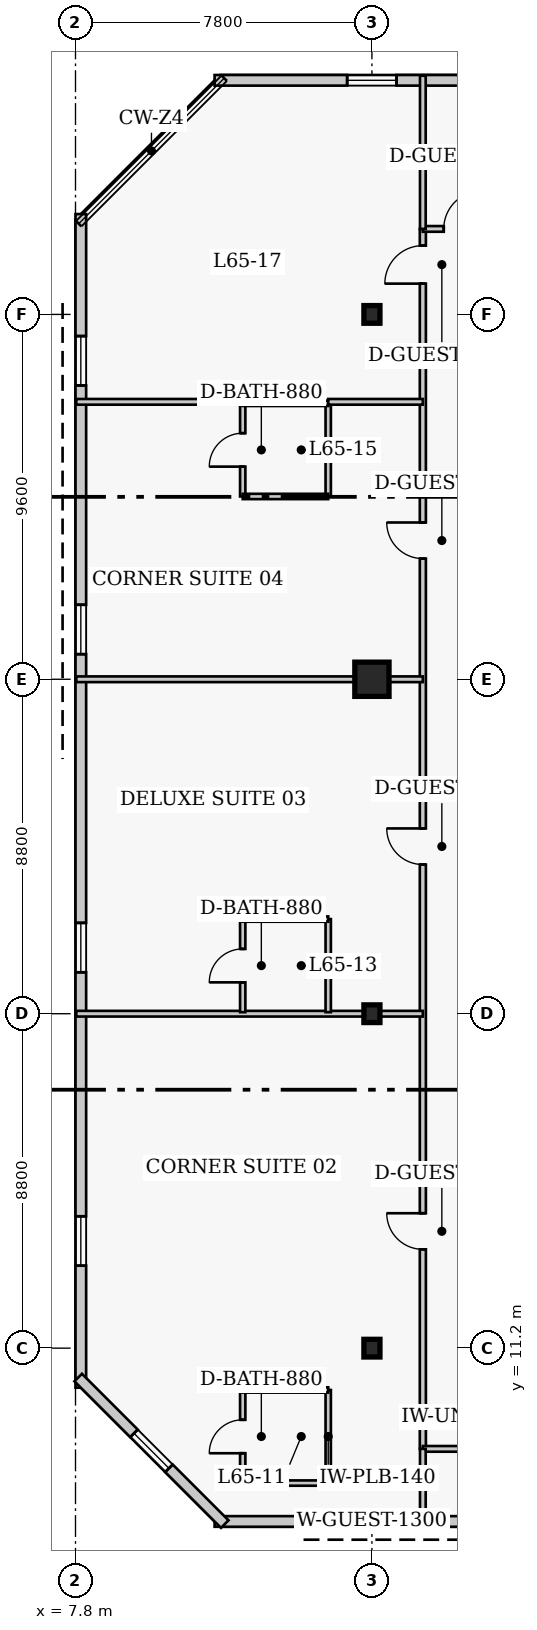
"""IFC4 building model, lengths in metres.
Left out: names, types, materials, properties, quantities, classifications, styles, units other than length and angle.
Written with IfcOpenShell. Run it as: python <this file> out.ifc"""

import sys

from ifc_helpers import new_model, si_unit, direction, frame, frame_2d, origin, origin_2d, place, context, subcontext, project, spatial, rectangle, i_section, extrude, element, fill, save


model = new_model("IFC4")
c1 = context("Model", 3, precision=1e-05, world=origin(), true_north=direction((0.0, 1.0)))
c2 = subcontext(c1, "Body", "Model", "MODEL_VIEW")
j1 = project(units=[si_unit("LENGTHUNIT", "METRE"), si_unit("PLANEANGLEUNIT", "RADIAN")], contexts=[c1])
p1 = place(None, origin())
s1 = spatial("IfcSite", under=j1, at=p1, CompositionType="ELEMENT")
p2 = place(p1, origin())
s2 = spatial("IfcBuilding", under=s1, at=p2, CompositionType="ELEMENT")
p3 = place(p2, frame((0.0, 0.0, 261.4)))
s3 = spatial("IfcBuildingStorey", under=s2, at=p3, CompositionType="ELEMENT", Elevation=261.4)
for number, where, z_axis, x_axis in (
    (1, (15.6, 11.2, 0.0), (0.0, 0.0, 1.0), (1.0, 0.0, 0.0)),
    (2, (15.6, 20.0, 0.0), (0.0, 0.0, 1.0), (1.0, 0.0, 0.0)),
):
    element("IfcColumn", number, at=place(p3, frame(where, z_axis=z_axis, x_axis=x_axis)), inside=s3, PredefinedType="COLUMN", context=c2, shape_type="SweptSolid", body=[
        extrude(i_section(OverallWidth=0.422, OverallDepth=0.465, WebThickness=0.045, FlangeThickness=0.073, FilletRadius=0.017, at=origin_2d()), origin(), (0.0, 0.0, 1.0), 4.0),
    ])
p4 = place(p3, frame((15.6, 28.8, 0.0), z_axis=(0.0, 0.0, 1.0), x_axis=(1.0, 0.0, 0.0)))
e3 = element("IfcColumn", 3, at=p4, inside=s3, PredefinedType="COLUMN", context=c2, shape_type="SweptSolid", body=[
    extrude(rectangle(XDim=0.9, YDim=0.9, at=origin_2d()), origin(), (0.0, 0.0, 1.0), 4.0),
])
p5 = place(p3, frame((15.6, 38.4, 0.0), z_axis=(0.0, 0.0, 1.0), x_axis=(1.0, 0.0, 0.0)))
e4 = element("IfcColumn", 4, at=p5, inside=s3, PredefinedType="COLUMN", context=c2, shape_type="SweptSolid", body=[
    extrude(i_section(OverallWidth=0.422, OverallDepth=0.465, WebThickness=0.045, FlangeThickness=0.073, FilletRadius=0.017, at=origin_2d()), origin(), (0.0, 0.0, 1.0), 4.0),
])
p6 = place(p3, frame((11.46, 6.64, 0.0), z_axis=(0.0, 0.0, 1.0), x_axis=(1.0, 0.0, 0.0)))
e5 = element("IfcWall", 5, at=p6, inside=s3, PredefinedType="SOLIDWALL", context=c2, shape_type="SweptSolid", body=[
    extrude(rectangle(XDim=24.83, YDim=0.28, at=frame_2d((12.415, 0.0))), origin(), (0.0, 0.0, 1.0), 3.76),
])
p7 = place(p6, frame((3.488, 0.0, 0.85)))
e6 = element("IfcOpeningElement", 6, at=p7, cuts=e5, PredefinedType="OPENING", context=c2, shape_type="SweptSolid", body=[
    extrude(rectangle(XDim=1.3, YDim=1.7, at=frame_2d((0.65, 0.85))), frame((0.0, 0.15, 0.0), z_axis=(0.0, -1.0, 0.0), x_axis=(1.0, 0.0, 0.0)), (0.0, 0.0, 1.0), 0.3),
])
p8 = place(p6, frame((12.915, 0.0, 0.85)))
e7 = element("IfcOpeningElement", 7, at=p8, cuts=e5, PredefinedType="OPENING", context=c2, shape_type="SweptSolid", body=[
    extrude(rectangle(XDim=1.3, YDim=1.7, at=frame_2d((0.65, 0.85))), frame((0.0, 0.15, 0.0), z_axis=(0.0, -1.0, 0.0), x_axis=(1.0, 0.0, 0.0)), (0.0, 0.0, 1.0), 0.3),
])
p9 = place(p6, frame((20.692, 0.0, 0.85)))
e8 = element("IfcOpeningElement", 8, at=p9, cuts=e5, PredefinedType="OPENING", context=c2, shape_type="SweptSolid", body=[
    extrude(rectangle(XDim=1.3, YDim=1.7, at=frame_2d((0.65, 0.85))), frame((0.0, 0.15, 0.0), z_axis=(0.0, -1.0, 0.0), x_axis=(1.0, 0.0, 0.0)), (0.0, 0.0, 1.0), 0.3),
])
p10 = place(p3, frame((36.29, 44.56, 0.0), z_axis=(0.0, 0.0, 1.0), x_axis=(-1.0, 0.0, 0.0)))
e9 = element("IfcWall", 9, at=p10, inside=s3, PredefinedType="SOLIDWALL", context=c2, shape_type="SweptSolid", body=[
    extrude(rectangle(XDim=24.83, YDim=0.28, at=frame_2d((12.415, 0.0))), origin(), (0.0, 0.0, 1.0), 3.76),
])
p11 = place(p10, frame((3.488, 0.0, 0.85)))
e10 = element("IfcOpeningElement", 10, at=p11, cuts=e9, PredefinedType="OPENING", context=c2, shape_type="SweptSolid", body=[
    extrude(rectangle(XDim=1.3, YDim=1.7, at=frame_2d((0.65, 0.85))), frame((0.0, 0.15, 0.0), z_axis=(0.0, -1.0, 0.0), x_axis=(1.0, 0.0, 0.0)), (0.0, 0.0, 1.0), 0.3),
])
p12 = place(p10, frame((11.765, 0.0, 0.85)))
e11 = element("IfcOpeningElement", 11, at=p12, cuts=e9, PredefinedType="OPENING", context=c2, shape_type="SweptSolid", body=[
    extrude(rectangle(XDim=1.3, YDim=1.7, at=frame_2d((0.65, 0.85))), frame((0.0, 0.15, 0.0), z_axis=(0.0, -1.0, 0.0), x_axis=(1.0, 0.0, 0.0)), (0.0, 0.0, 1.0), 0.3),
])
p13 = place(p10, frame((20.042, 0.0, 0.85)))
e12 = element("IfcOpeningElement", 12, at=p13, cuts=e9, PredefinedType="OPENING", context=c2, shape_type="SweptSolid", body=[
    extrude(rectangle(XDim=1.3, YDim=1.7, at=frame_2d((0.65, 0.85))), frame((0.0, 0.15, 0.0), z_axis=(0.0, -1.0, 0.0), x_axis=(1.0, 0.0, 0.0)), (0.0, 0.0, 1.0), 0.3),
])
p14 = place(p3, frame((7.94, 41.04, 0.0), z_axis=(0.0, 0.0, 1.0), x_axis=(0.0, -1.0, 0.0)))
e13 = element("IfcWall", 13, at=p14, inside=s3, PredefinedType="SOLIDWALL", context=c2, shape_type="SweptSolid", body=[
    extrude(rectangle(XDim=30.88, YDim=0.28, at=frame_2d((15.44, 0.0))), origin(), (0.0, 0.0, 1.0), 3.76),
])
p15 = place(p14, frame((3.21, 0.0, 0.85)))
e14 = element("IfcOpeningElement", 14, at=p15, cuts=e13, PredefinedType="OPENING", context=c2, shape_type="SweptSolid", body=[
    extrude(rectangle(XDim=1.3, YDim=1.7, at=frame_2d((0.65, 0.85))), frame((0.0, 0.15, 0.0), z_axis=(0.0, -1.0, 0.0), x_axis=(1.0, 0.0, 0.0)), (0.0, 0.0, 1.0), 0.3),
])
p16 = place(p14, frame((10.28, 0.0, 0.85)))
e15 = element("IfcOpeningElement", 15, at=p16, cuts=e13, PredefinedType="OPENING", context=c2, shape_type="SweptSolid", body=[
    extrude(rectangle(XDim=1.3, YDim=1.7, at=frame_2d((0.65, 0.85))), frame((0.0, 0.15, 0.0), z_axis=(0.0, -1.0, 0.0), x_axis=(1.0, 0.0, 0.0)), (0.0, 0.0, 1.0), 0.3),
])
p17 = place(p14, frame((18.65, 0.0, 0.85)))
e16 = element("IfcOpeningElement", 16, at=p17, cuts=e13, PredefinedType="OPENING", context=c2, shape_type="SweptSolid", body=[
    extrude(rectangle(XDim=1.3, YDim=1.7, at=frame_2d((0.65, 0.85))), frame((0.0, 0.15, 0.0), z_axis=(0.0, -1.0, 0.0), x_axis=(1.0, 0.0, 0.0)), (0.0, 0.0, 1.0), 0.3),
])
p18 = place(p14, frame((26.37, 0.0, 0.85)))
e17 = element("IfcOpeningElement", 17, at=p18, cuts=e13, PredefinedType="OPENING", context=c2, shape_type="SweptSolid", body=[
    extrude(rectangle(XDim=1.3, YDim=1.7, at=frame_2d((0.65, 0.85))), frame((0.0, 0.15, 0.0), z_axis=(0.0, -1.0, 0.0), x_axis=(1.0, 0.0, 0.0)), (0.0, 0.0, 1.0), 0.3),
])
p19 = place(p3, frame((7.871, 10.427, 0.0), z_axis=(0.0, 0.0, 1.0), x_axis=(0.707129162587, -0.707084399077, 0.0)))
e18 = element("IfcWall", 18, at=p19, inside=s3, PredefinedType="SOLIDWALL", context=c2, shape_type="SweptSolid", body=[
    extrude(rectangle(XDim=5.454, YDim=0.28, at=frame_2d((2.727, 0.0))), origin(), (0.0, 0.0, 1.0), 3.76),
])
p20 = place(p19, frame((2.077, 0.0, 0.85)))
e19 = element("IfcOpeningElement", 19, at=p20, cuts=e18, PredefinedType="OPENING", context=c2, shape_type="SweptSolid", body=[
    extrude(rectangle(XDim=1.3, YDim=1.7, at=frame_2d((0.65, 0.85))), frame((0.0, 0.15, 0.0), z_axis=(0.0, -1.0, 0.0), x_axis=(1.0, 0.0, 0.0)), (0.0, 0.0, 1.0), 0.3),
])
p21 = place(p3, frame((16.94, 8.55, 0.0), z_axis=(0.0, 0.0, 1.0), x_axis=(0.0, 1.0, 0.0)))
e20 = element("IfcWall", 20, at=p21, inside=s3, PredefinedType="PARTITIONING", context=c2, shape_type="SweptSolid", body=[
    extrude(rectangle(XDim=32.1, YDim=0.16, at=frame_2d((16.05, 0.0))), origin(), (0.0, 0.0, 1.0), 3.76),
])
p22 = place(p21, frame((5.25, 0.0, 0.0)))
e21 = element("IfcOpeningElement", 21, at=p22, cuts=e20, PredefinedType="OPENING", context=c2, shape_type="SweptSolid", body=[
    extrude(rectangle(XDim=0.95, YDim=2.1, at=frame_2d((0.475, 1.05))), frame((0.0, 0.09, 0.0), z_axis=(0.0, -1.0, 0.0), x_axis=(1.0, 0.0, 0.0)), (0.0, 0.0, 1.0), 0.18),
])
p23 = place(p21, frame((15.375, 0.0, 0.0)))
e22 = element("IfcOpeningElement", 22, at=p23, cuts=e20, PredefinedType="OPENING", context=c2, shape_type="SweptSolid", body=[
    extrude(rectangle(XDim=0.95, YDim=2.1, at=frame_2d((0.475, 1.05))), frame((0.0, 0.09, 0.0), z_axis=(0.0, -1.0, 0.0), x_axis=(1.0, 0.0, 0.0)), (0.0, 0.0, 1.0), 0.18),
])
p24 = place(p21, frame((23.425, 0.0, 0.0)))
e23 = element("IfcOpeningElement", 23, at=p24, cuts=e20, PredefinedType="OPENING", context=c2, shape_type="SweptSolid", body=[
    extrude(rectangle(XDim=0.95, YDim=2.1, at=frame_2d((0.475, 1.05))), frame((0.0, 0.09, 0.0), z_axis=(0.0, -1.0, 0.0), x_axis=(1.0, 0.0, 0.0)), (0.0, 0.0, 1.0), 0.18),
])
p25 = place(p21, frame((30.66, 0.0, 0.0)))
e24 = element("IfcOpeningElement", 24, at=p25, cuts=e20, PredefinedType="OPENING", context=c2, shape_type="SweptSolid", body=[
    extrude(rectangle(XDim=1.0, YDim=2.15, at=frame_2d((0.5, 1.075))), frame((0.0, 0.09, 0.0), z_axis=(0.0, -1.0, 0.0), x_axis=(1.0, 0.0, 0.0)), (0.0, 0.0, 1.0), 0.18),
])
p26 = place(p3, frame((16.94, 8.55, 0.0), z_axis=(0.0, 0.0, 1.0), x_axis=(1.0, 0.0, 0.0)))
e25 = element("IfcWall", 25, at=p26, inside=s3, PredefinedType="PARTITIONING", context=c2, shape_type="SweptSolid", body=[
    extrude(rectangle(XDim=2.22, YDim=0.15, at=frame_2d((1.11, 0.0))), origin(), (0.0, 0.0, 1.0), 3.76),
])
p27 = place(p3, frame((16.94, 40.65, 0.0), z_axis=(0.0, 0.0, 1.0), x_axis=(1.0, 0.0, 0.0)))
e26 = element("IfcWall", 26, at=p27, inside=s3, PredefinedType="PARTITIONING", context=c2, shape_type="SweptSolid", body=[
    extrude(rectangle(XDim=5.16, YDim=0.15, at=frame_2d((2.58, 0.0))), origin(), (0.0, 0.0, 1.0), 3.76),
])
p28 = place(p27, frame((0.55, 0.0, 0.0)))
e27 = element("IfcOpeningElement", 27, at=p28, cuts=e26, PredefinedType="OPENING", context=c2, shape_type="SweptSolid", body=[
    extrude(rectangle(XDim=1.0, YDim=2.15, at=frame_2d((0.5, 1.075))), frame((0.0, 0.085, 0.0), z_axis=(0.0, -1.0, 0.0), x_axis=(1.0, 0.0, 0.0)), (0.0, 0.0, 1.0), 0.17),
])
p29 = place(p3, frame((16.94, 40.65, 0.0), z_axis=(0.0, 0.0, 1.0), x_axis=(0.0, 1.0, 0.0)))
e28 = element("IfcWall", 28, at=p29, inside=s3, PredefinedType="PARTITIONING", context=c2, shape_type="SweptSolid", body=[
    extrude(rectangle(XDim=4.03, YDim=0.15, at=frame_2d((2.015, 0.0))), origin(), (0.0, 0.0, 1.0), 3.76),
])
p30 = place(p3, frame((16.94, 6.52, 0.0), z_axis=(0.0, 0.0, 1.0), x_axis=(0.0, 1.0, 0.0)))
e29 = element("IfcWall", 29, at=p30, inside=s3, PredefinedType="PARTITIONING", context=c2, shape_type="SweptSolid", body=[
    extrude(rectangle(XDim=2.03, YDim=0.15, at=frame_2d((1.015, 0.0))), origin(), (0.0, 0.0, 1.0), 3.76),
])
p31 = place(p3, frame((12.2, 7.65, 0.0), z_axis=(0.0, 0.0, 1.0), x_axis=(0.0, 1.0, 0.0)))
e30 = element("IfcWall", 30, at=p31, inside=s3, PredefinedType="PLUMBINGWALL", context=c2, shape_type="SweptSolid", body=[
    extrude(rectangle(XDim=2.45, YDim=0.14, at=frame_2d((1.225, 0.0))), origin(), (0.0, 0.0, 1.0), 3.76),
])
p32 = place(p31, frame((0.785, 0.0, 0.0)))
e31 = element("IfcOpeningElement", 31, at=p32, cuts=e30, PredefinedType="OPENING", context=c2, shape_type="SweptSolid", body=[
    extrude(rectangle(XDim=0.88, YDim=2.05, at=frame_2d((0.44, 1.025))), frame((0.0, 0.08, 0.0), z_axis=(0.0, -1.0, 0.0), x_axis=(1.0, 0.0, 0.0)), (0.0, 0.0, 1.0), 0.16),
])
p33 = place(p3, frame((14.45, 7.65, 0.0), z_axis=(0.0, 0.0, 1.0), x_axis=(0.0, 1.0, 0.0)))
e32 = element("IfcWall", 32, at=p33, inside=s3, PredefinedType="PLUMBINGWALL", context=c2, shape_type="SweptSolid", body=[
    extrude(rectangle(XDim=2.45, YDim=0.14, at=frame_2d((1.225, 0.0))), origin(), (0.0, 0.0, 1.0), 3.76),
])
for number, where, z_axis, x_axis in (
    (33, (12.2, 7.65, 0.0), (0.0, 0.0, 1.0), (1.0, 0.0, 0.0)),
    (34, (12.2, 10.1, 0.0), (0.0, 0.0, 1.0), (1.0, 0.0, 0.0)),
):
    element("IfcWall", number, at=place(p3, frame(where, z_axis=z_axis, x_axis=x_axis)), inside=s3, PredefinedType="PLUMBINGWALL", context=c2, shape_type="SweptSolid", body=[
        extrude(rectangle(XDim=2.25, YDim=0.14, at=frame_2d((1.125, 0.0))), origin(), (0.0, 0.0, 1.0), 3.76),
    ])
p34 = place(p3, frame((7.82, 20.0, 0.0), z_axis=(0.0, 0.0, 1.0), x_axis=(1.0, 0.0, 0.0)))
e35 = element("IfcWall", 35, at=p34, inside=s3, PredefinedType="PARTITIONING", context=c2, shape_type="SweptSolid", body=[
    extrude(rectangle(XDim=9.12, YDim=0.15, at=frame_2d((4.56, 0.0))), origin(), (0.0, 0.0, 1.0), 3.064),
])
p35 = place(p3, frame((12.2, 20.04, 0.0), z_axis=(0.0, 0.0, 1.0), x_axis=(0.0, 1.0, 0.0)))
e36 = element("IfcWall", 36, at=p35, inside=s3, PredefinedType="PLUMBINGWALL", context=c2, shape_type="SweptSolid", body=[
    extrude(rectangle(XDim=2.45, YDim=0.14, at=frame_2d((1.225, 0.0))), origin(), (0.0, 0.0, 1.0), 3.76),
])
p36 = place(p35, frame((0.785, 0.0, 0.0)))
e37 = element("IfcOpeningElement", 37, at=p36, cuts=e36, PredefinedType="OPENING", context=c2, shape_type="SweptSolid", body=[
    extrude(rectangle(XDim=0.88, YDim=2.05, at=frame_2d((0.44, 1.025))), frame((0.0, 0.08, 0.0), z_axis=(0.0, -1.0, 0.0), x_axis=(1.0, 0.0, 0.0)), (0.0, 0.0, 1.0), 0.16),
])
p37 = place(p3, frame((14.45, 20.04, 0.0), z_axis=(0.0, 0.0, 1.0), x_axis=(0.0, 1.0, 0.0)))
e38 = element("IfcWall", 38, at=p37, inside=s3, PredefinedType="PLUMBINGWALL", context=c2, shape_type="SweptSolid", body=[
    extrude(rectangle(XDim=2.45, YDim=0.14, at=frame_2d((1.225, 0.0))), origin(), (0.0, 0.0, 1.0), 3.76),
])
p38 = place(p3, frame((12.2, 22.49, 0.0), z_axis=(0.0, 0.0, 1.0), x_axis=(1.0, 0.0, 0.0)))
e39 = element("IfcWall", 39, at=p38, inside=s3, PredefinedType="PLUMBINGWALL", context=c2, shape_type="SweptSolid", body=[
    extrude(rectangle(XDim=2.25, YDim=0.14, at=frame_2d((1.125, 0.0))), origin(), (0.0, 0.0, 1.0), 3.76),
])
p39 = place(p3, frame((7.82, 28.8, 0.0), z_axis=(0.0, 0.0, 1.0), x_axis=(1.0, 0.0, 0.0)))
e40 = element("IfcWall", 40, at=p39, inside=s3, PredefinedType="PARTITIONING", context=c2, shape_type="SweptSolid", body=[
    extrude(rectangle(XDim=9.12, YDim=0.15, at=frame_2d((4.56, 0.0))), origin(), (0.0, 0.0, 1.0), 3.064),
])
p40 = place(p3, frame((12.2, 33.61, 0.0), z_axis=(0.0, 0.0, 1.0), x_axis=(0.0, 1.0, 0.0)))
e41 = element("IfcWall", 41, at=p40, inside=s3, PredefinedType="PLUMBINGWALL", context=c2, shape_type="SweptSolid", body=[
    extrude(rectangle(XDim=2.45, YDim=0.14, at=frame_2d((1.225, 0.0))), origin(), (0.0, 0.0, 1.0), 3.76),
])
p41 = place(p40, frame((0.785, 0.0, 0.0)))
e42 = element("IfcOpeningElement", 42, at=p41, cuts=e41, PredefinedType="OPENING", context=c2, shape_type="SweptSolid", body=[
    extrude(rectangle(XDim=0.88, YDim=2.05, at=frame_2d((0.44, 1.025))), frame((0.0, 0.08, 0.0), z_axis=(0.0, -1.0, 0.0), x_axis=(1.0, 0.0, 0.0)), (0.0, 0.0, 1.0), 0.16),
])
p42 = place(p3, frame((14.45, 33.61, 0.0), z_axis=(0.0, 0.0, 1.0), x_axis=(0.0, 1.0, 0.0)))
e43 = element("IfcWall", 43, at=p42, inside=s3, PredefinedType="PLUMBINGWALL", context=c2, shape_type="SweptSolid", body=[
    extrude(rectangle(XDim=2.45, YDim=0.14, at=frame_2d((1.225, 0.0))), origin(), (0.0, 0.0, 1.0), 3.76),
])
for number, where, z_axis, x_axis in (
    (44, (12.2, 33.61, 0.0), (0.0, 0.0, 1.0), (1.0, 0.0, 0.0)),
    (45, (12.2, 36.06, 0.0), (0.0, 0.0, 1.0), (1.0, 0.0, 0.0)),
):
    element("IfcWall", number, at=place(p3, frame(where, z_axis=z_axis, x_axis=x_axis)), inside=s3, PredefinedType="PLUMBINGWALL", context=c2, shape_type="SweptSolid", body=[
        extrude(rectangle(XDim=2.25, YDim=0.14, at=frame_2d((1.125, 0.0))), origin(), (0.0, 0.0, 1.0), 3.76),
    ])
p43 = place(p3, frame((7.82, 36.1, 0.0), z_axis=(0.0, 0.0, 1.0), x_axis=(1.0, 0.0, 0.0)))
e46 = element("IfcWall", 46, at=p43, inside=s3, PredefinedType="PARTITIONING", context=c2, shape_type="SweptSolid", body=[
    extrude(rectangle(XDim=4.38, YDim=0.15, at=frame_2d((2.19, 0.0))), origin(), (0.0, 0.0, 1.0), 3.76),
])
p44 = place(p3, frame((14.45, 36.1, 0.0), z_axis=(0.0, 0.0, 1.0), x_axis=(1.0, 0.0, 0.0)))
e47 = element("IfcWall", 47, at=p44, inside=s3, PredefinedType="PARTITIONING", context=c2, shape_type="SweptSolid", body=[
    extrude(rectangle(XDim=2.49, YDim=0.15, at=frame_2d((1.245, 0.0))), origin(), (0.0, 0.0, 1.0), 3.76),
])
p45 = place(p7, origin())
e48 = element("IfcWindow", 48, at=p45, inside=s3, PartitioningType="SINGLE_PANEL", PredefinedType="WINDOW", context=c2, shape_type="SweptSolid", body=[
    extrude(rectangle(XDim=1.3, YDim=1.7, at=frame_2d((0.65, 0.85))), frame((0.0, 0.03, 0.0), z_axis=(0.0, -1.0, 0.0), x_axis=(1.0, 0.0, 0.0)), (0.0, 0.0, 1.0), 0.06),
])
fill(e6, e48)
p46 = place(p13, origin())
e49 = element("IfcWindow", 49, at=p46, inside=s3, PartitioningType="SINGLE_PANEL", PredefinedType="WINDOW", context=c2, shape_type="SweptSolid", body=[
    extrude(rectangle(XDim=1.3, YDim=1.7, at=frame_2d((0.65, 0.85))), frame((0.0, 0.03, 0.0), z_axis=(0.0, -1.0, 0.0), x_axis=(1.0, 0.0, 0.0)), (0.0, 0.0, 1.0), 0.06),
])
fill(e12, e49)
p47 = place(p15, origin())
e50 = element("IfcWindow", 50, at=p47, inside=s3, PartitioningType="SINGLE_PANEL", PredefinedType="WINDOW", context=c2, shape_type="SweptSolid", body=[
    extrude(rectangle(XDim=1.3, YDim=1.7, at=frame_2d((0.65, 0.85))), frame((0.0, 0.03, 0.0), z_axis=(0.0, -1.0, 0.0), x_axis=(1.0, 0.0, 0.0)), (0.0, 0.0, 1.0), 0.06),
])
fill(e14, e50)
p48 = place(p16, origin())
e51 = element("IfcWindow", 51, at=p48, inside=s3, PartitioningType="SINGLE_PANEL", PredefinedType="WINDOW", context=c2, shape_type="SweptSolid", body=[
    extrude(rectangle(XDim=1.3, YDim=1.7, at=frame_2d((0.65, 0.85))), frame((0.0, 0.03, 0.0), z_axis=(0.0, -1.0, 0.0), x_axis=(1.0, 0.0, 0.0)), (0.0, 0.0, 1.0), 0.06),
])
fill(e15, e51)
p49 = place(p17, origin())
e52 = element("IfcWindow", 52, at=p49, inside=s3, PartitioningType="SINGLE_PANEL", PredefinedType="WINDOW", context=c2, shape_type="SweptSolid", body=[
    extrude(rectangle(XDim=1.3, YDim=1.7, at=frame_2d((0.65, 0.85))), frame((0.0, 0.03, 0.0), z_axis=(0.0, -1.0, 0.0), x_axis=(1.0, 0.0, 0.0)), (0.0, 0.0, 1.0), 0.06),
])
fill(e16, e52)
p50 = place(p18, origin())
e53 = element("IfcWindow", 53, at=p50, inside=s3, PartitioningType="SINGLE_PANEL", PredefinedType="WINDOW", context=c2, shape_type="SweptSolid", body=[
    extrude(rectangle(XDim=1.3, YDim=1.7, at=frame_2d((0.65, 0.85))), frame((0.0, 0.03, 0.0), z_axis=(0.0, -1.0, 0.0), x_axis=(1.0, 0.0, 0.0)), (0.0, 0.0, 1.0), 0.06),
])
fill(e17, e53)
p51 = place(p20, origin())
e54 = element("IfcWindow", 54, at=p51, inside=s3, PartitioningType="SINGLE_PANEL", PredefinedType="WINDOW", context=c2, shape_type="SweptSolid", body=[
    extrude(rectangle(XDim=1.3, YDim=1.7, at=frame_2d((0.65, 0.85))), frame((0.0, 0.03, 0.0), z_axis=(0.0, -1.0, 0.0), x_axis=(1.0, 0.0, 0.0)), (0.0, 0.0, 1.0), 0.06),
])
fill(e19, e54)
p52 = place(p28, origin())
e55 = element("IfcDoor", 55, at=p52, inside=s3, OperationType="SINGLE_SWING_RIGHT", PredefinedType="DOOR", context=c2, shape_type="SweptSolid", body=[
    extrude(rectangle(XDim=1.0, YDim=2.15, at=frame_2d((0.5, 1.075))), frame((0.0, 0.025, 0.0), z_axis=(0.0, -1.0, 0.0), x_axis=(1.0, 0.0, 0.0)), (0.0, 0.0, 1.0), 0.05),
])
fill(e27, e55)
p53 = place(p32, origin())
e56 = element("IfcDoor", 56, at=p53, inside=s3, OperationType="SINGLE_SWING_LEFT", PredefinedType="DOOR", context=c2, shape_type="SweptSolid", body=[
    extrude(rectangle(XDim=0.88, YDim=2.05, at=frame_2d((0.44, 1.025))), frame((0.0, 0.025, 0.0), z_axis=(0.0, -1.0, 0.0), x_axis=(1.0, 0.0, 0.0)), (0.0, 0.0, 1.0), 0.05),
])
fill(e31, e56)
p54 = place(p22, origin())
e57 = element("IfcDoor", 57, at=p54, inside=s3, OperationType="SINGLE_SWING_RIGHT", PredefinedType="DOOR", context=c2, shape_type="SweptSolid", body=[
    extrude(rectangle(XDim=0.95, YDim=2.1, at=frame_2d((0.475, 1.05))), frame((0.0, 0.025, 0.0), z_axis=(0.0, -1.0, 0.0), x_axis=(1.0, 0.0, 0.0)), (0.0, 0.0, 1.0), 0.05),
])
fill(e21, e57)
p55 = place(p36, origin())
e58 = element("IfcDoor", 58, at=p55, inside=s3, OperationType="SINGLE_SWING_LEFT", PredefinedType="DOOR", context=c2, shape_type="SweptSolid", body=[
    extrude(rectangle(XDim=0.88, YDim=2.05, at=frame_2d((0.44, 1.025))), frame((0.0, 0.025, 0.0), z_axis=(0.0, -1.0, 0.0), x_axis=(1.0, 0.0, 0.0)), (0.0, 0.0, 1.0), 0.05),
])
fill(e37, e58)
p56 = place(p23, origin())
e59 = element("IfcDoor", 59, at=p56, inside=s3, OperationType="SINGLE_SWING_RIGHT", PredefinedType="DOOR", context=c2, shape_type="SweptSolid", body=[
    extrude(rectangle(XDim=0.95, YDim=2.1, at=frame_2d((0.475, 1.05))), frame((0.0, 0.025, 0.0), z_axis=(0.0, -1.0, 0.0), x_axis=(1.0, 0.0, 0.0)), (0.0, 0.0, 1.0), 0.05),
])
fill(e22, e59)
p57 = place(p41, origin())
e60 = element("IfcDoor", 60, at=p57, inside=s3, OperationType="SINGLE_SWING_LEFT", PredefinedType="DOOR", context=c2, shape_type="SweptSolid", body=[
    extrude(rectangle(XDim=0.88, YDim=2.05, at=frame_2d((0.44, 1.025))), frame((0.0, 0.025, 0.0), z_axis=(0.0, -1.0, 0.0), x_axis=(1.0, 0.0, 0.0)), (0.0, 0.0, 1.0), 0.05),
])
fill(e42, e60)
p58 = place(p24, origin())
e61 = element("IfcDoor", 61, at=p58, inside=s3, OperationType="SINGLE_SWING_RIGHT", PredefinedType="DOOR", context=c2, shape_type="SweptSolid", body=[
    extrude(rectangle(XDim=0.95, YDim=2.1, at=frame_2d((0.475, 1.05))), frame((0.0, 0.025, 0.0), z_axis=(0.0, -1.0, 0.0), x_axis=(1.0, 0.0, 0.0)), (0.0, 0.0, 1.0), 0.05),
])
fill(e23, e61)
p59 = place(p25, origin())
e62 = element("IfcDoor", 62, at=p59, inside=s3, OperationType="SINGLE_SWING_LEFT", PredefinedType="DOOR", context=c2, shape_type="SweptSolid", body=[
    extrude(rectangle(XDim=1.0, YDim=2.15, at=frame_2d((0.5, 1.075))), frame((0.0, 0.025, 0.0), z_axis=(0.0, -1.0, 0.0), x_axis=(1.0, 0.0, 0.0)), (0.0, 0.0, 1.0), 0.05),
])
fill(e24, e62)
save(model, sys.argv[1])
